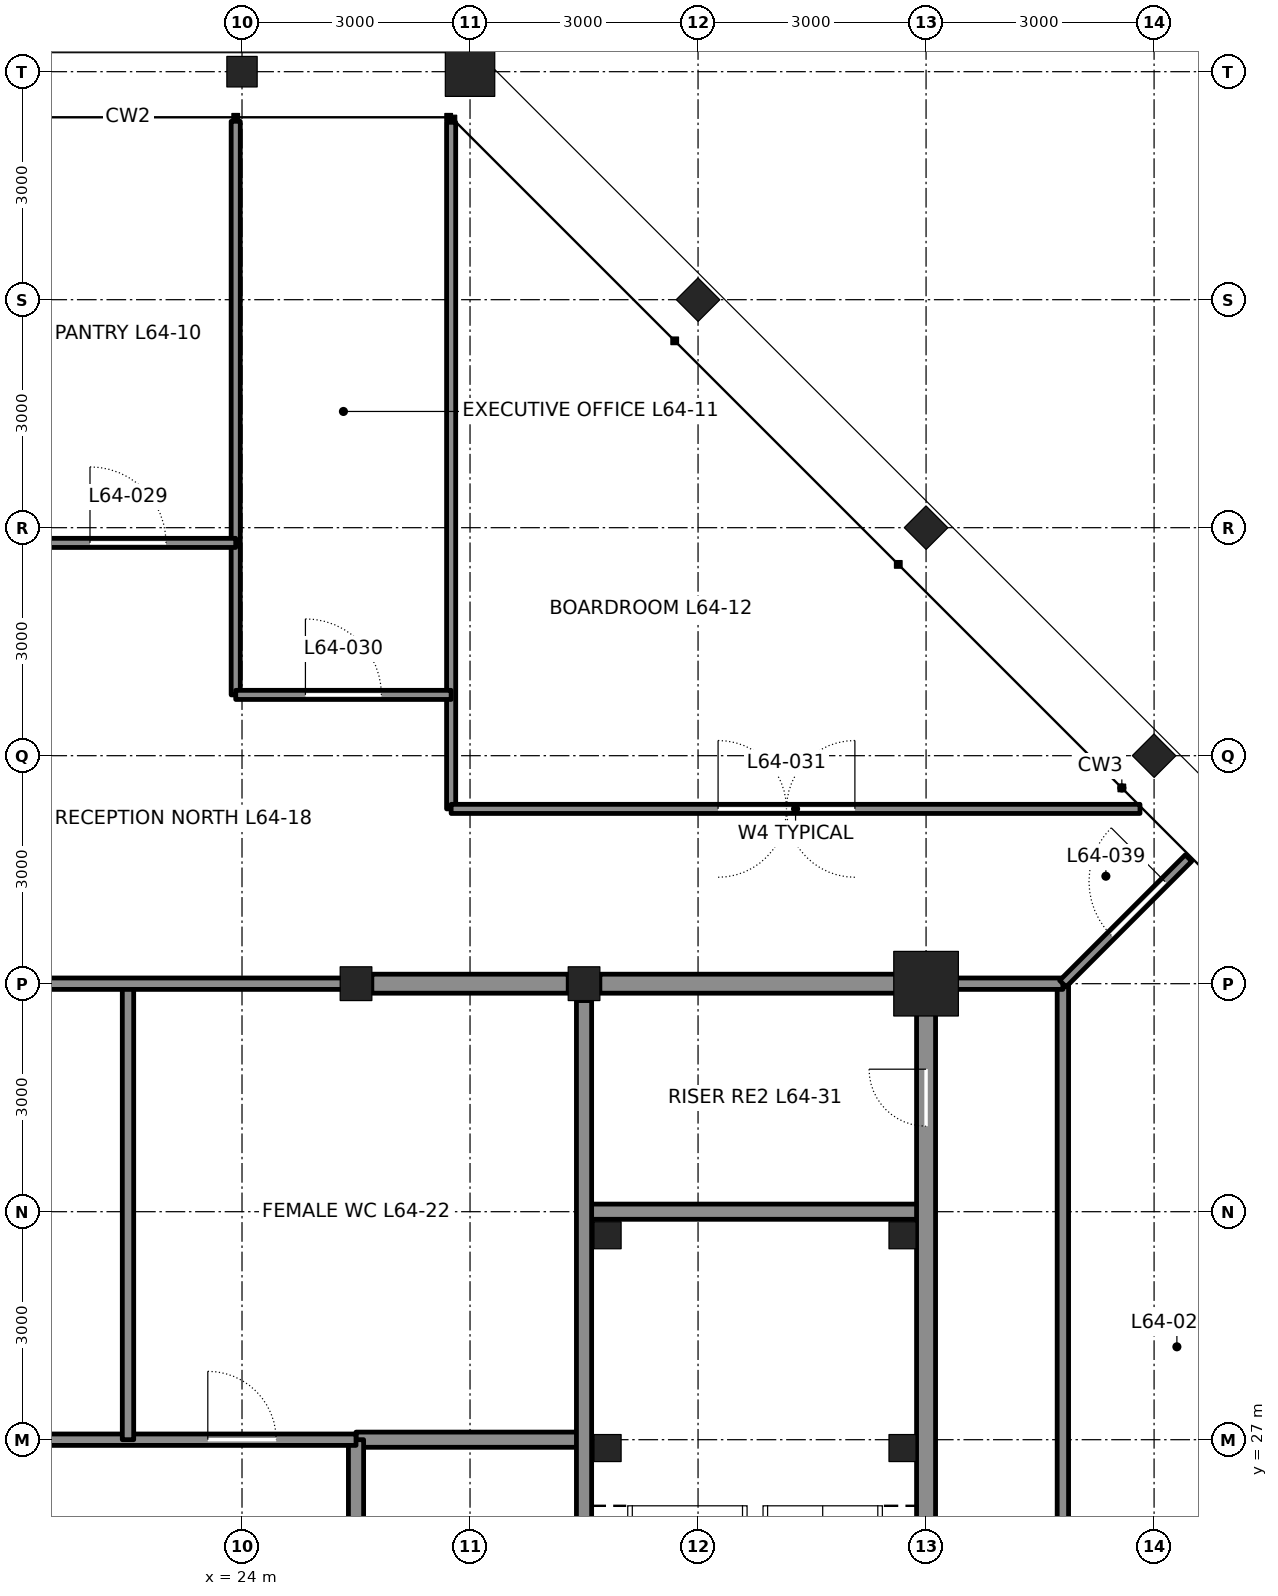
"""IFC4 building model, lengths in metres.
Left out: names, types, materials, properties, quantities, classifications, styles, units other than length and angle.
Written with IfcOpenShell. Run it as: python <this file> out.ifc"""

import sys

from ifc_helpers import new_model, si_unit, direction, frame, frame_2d, origin, origin_2d, place, context, subcontext, project, spatial, rectangle, hollow_rectangle, i_section, extrude, element, fill, save


model = new_model("IFC4")
c1 = context("Model", 3, precision=1e-05, world=origin(), true_north=direction((0.0, 1.0)))
c2 = subcontext(c1, "Body", "Model", "MODEL_VIEW")
j1 = project(units=[si_unit("LENGTHUNIT", "METRE"), si_unit("PLANEANGLEUNIT", "RADIAN")], contexts=[c1])
p1 = place(None, origin())
s1 = spatial("IfcSite", under=j1, at=p1, CompositionType="ELEMENT")
p2 = place(p1, origin())
s2 = spatial("IfcBuilding", under=s1, at=p2, CompositionType="ELEMENT")
p3 = place(p2, frame((0.0, 0.0, 287.4)))
s3 = spatial("IfcBuildingStorey", under=s2, at=p3, CompositionType="ELEMENT", Elevation=287.4)
for number, where, z_axis, x_axis in (
    (1, (36.0, 36.0, 0.0), (0.0, 0.0, 1.0), (0.707, 0.707, 0.0)),
    (2, (33.0, 39.0, 0.0), (0.0, 0.0, 1.0), (0.707, 0.707, 0.0)),
    (3, (30.0, 42.0, 0.0), (0.0, 0.0, 1.0), (0.707, 0.707, 0.0)),
):
    element("IfcColumn", number, at=place(p3, frame(where, z_axis=z_axis, x_axis=x_axis)), inside=s3, PredefinedType="COLUMN", context=c2, shape_type="SweptSolid", body=[
        extrude(i_section(OverallWidth=0.404, OverallDepth=0.406, WebThickness=0.027, FlangeThickness=0.044, at=origin_2d()), origin(), (0.0, 0.0, 1.0), 4.2),
    ])
p4 = place(p3, frame((27.0, 45.0, 0.0), z_axis=(0.0, 0.0, 1.0), x_axis=(0.0, 1.0, 0.0)))
e4 = element("IfcColumn", 4, at=p4, inside=s3, PredefinedType="COLUMN", context=c2, shape_type="SweptSolid", body=[
    extrude(hollow_rectangle(XDim=0.65, YDim=0.65, WallThickness=0.065, at=origin_2d()), origin(), (0.0, 0.0, 1.0), 4.2),
])
p5 = place(p3, frame((24.0, 45.0, 0.0), z_axis=(0.0, 0.0, 1.0), x_axis=(0.0, 1.0, 0.0)))
e5 = element("IfcColumn", 5, at=p5, inside=s3, PredefinedType="COLUMN", context=c2, shape_type="SweptSolid", body=[
    extrude(i_section(OverallWidth=0.401, OverallDepth=0.399, WebThickness=0.025, FlangeThickness=0.04, at=origin_2d()), origin(), (0.0, 0.0, 1.0), 4.2),
])
for number, where, z_axis, x_axis in (
    (6, (25.5, 33.0, 0.0), (0.0, 0.0, 1.0), (1.0, 0.0, 0.0)),
    (7, (28.5, 33.0, 0.0), (0.0, 0.0, 1.0), (1.0, 0.0, 0.0)),
):
    element("IfcColumn", number, at=place(p3, frame(where, z_axis=z_axis, x_axis=x_axis)), inside=s3, PredefinedType="COLUMN", context=c2, shape_type="SweptSolid", body=[
        extrude(i_section(OverallWidth=0.417, OverallDepth=0.445, WebThickness=0.039, FlangeThickness=0.063, at=origin_2d()), origin(), (0.0, 0.0, 1.0), 4.2),
    ])
p6 = place(p3, frame((33.0, 33.0, 0.0), z_axis=(0.0, 0.0, 1.0), x_axis=(1.0, 0.0, 0.0)))
e8 = element("IfcColumn", 8, at=p6, inside=s3, PredefinedType="COLUMN", context=c2, shape_type="SweptSolid", body=[
    extrude(hollow_rectangle(XDim=0.85, YDim=0.85, WallThickness=0.085, at=origin_2d()), origin(), (0.0, 0.0, 1.0), 4.2),
])
p7 = place(p3, frame((25.5, 27.0, 0.0), z_axis=(0.0, 0.0, 1.0), x_axis=(1.0, 0.0, 0.0)))
e9 = element("IfcWall", 9, at=p7, inside=s3, PredefinedType="SOLIDWALL", context=c2, shape_type="SweptSolid", body=[
    extrude(rectangle(XDim=3.0, YDim=0.2, at=frame_2d((1.5, 0.0))), origin(), (0.0, 0.0, 1.0), 4.04),
])
p8 = place(p3, frame((28.5, 30.0, 0.0), z_axis=(0.0, 0.0, 1.0), x_axis=(1.0, 0.0, 0.0)))
e10 = element("IfcWall", 10, at=p8, inside=s3, PredefinedType="SOLIDWALL", context=c2, shape_type="SweptSolid", body=[
    extrude(rectangle(XDim=4.5, YDim=0.2, at=frame_2d((2.25, 0.0))), origin(), (0.0, 0.0, 1.0), 4.04),
])
p9 = place(p3, frame((25.708, 33.0, 0.0), z_axis=(0.0, 0.0, 1.0), x_axis=(1.0, 0.0, 0.0)))
e11 = element("IfcWall", 11, at=p9, inside=s3, PredefinedType="SOLIDWALL", context=c2, shape_type="SweptSolid", body=[
    extrude(rectangle(XDim=2.583, YDim=0.25, at=frame_2d((1.292, 0.0))), origin(), (0.0, 0.0, 1.0), 3.182),
])
p10 = place(p3, frame((28.708, 33.0, 0.0), z_axis=(0.0, 0.0, 1.0), x_axis=(1.0, 0.0, 0.0)))
e12 = element("IfcWall", 12, at=p10, inside=s3, PredefinedType="SOLIDWALL", context=c2, shape_type="SweptSolid", body=[
    extrude(rectangle(XDim=4.042, YDim=0.25, at=frame_2d((2.021, 0.0))), origin(), (0.0, 0.0, 1.0), 3.182),
])
p11 = place(p3, frame((25.5, 15.0, 0.0), z_axis=(0.0, 0.0, 1.0), x_axis=(0.0, 1.0, 0.0)))
e13 = element("IfcWall", 13, at=p11, inside=s3, PredefinedType="SOLIDWALL", context=c2, shape_type="SweptSolid", body=[
    extrude(rectangle(XDim=12.0, YDim=0.2, at=frame_2d((6.0, 0.0))), origin(), (0.0, 0.0, 1.0), 3.065),
])
p12 = place(p11, frame((2.55, 0.0, 0.0)))
e14 = element("IfcOpeningElement", 14, at=p12, cuts=e13, PredefinedType="OPENING", context=c2, shape_type="SweptSolid", body=[
    extrude(rectangle(XDim=0.9, YDim=2.1, at=frame_2d((0.45, 1.05))), frame((0.0, 0.11, 0.0), z_axis=(0.0, -1.0, 0.0), x_axis=(1.0, 0.0, 0.0)), (0.0, 0.0, 1.0), 0.22),
])
p13 = place(p3, frame((28.5, 24.222, 0.0), z_axis=(0.0, 0.0, 1.0), x_axis=(0.0, 1.0, 0.0)))
e15 = element("IfcWall", 15, at=p13, inside=s3, PredefinedType="SOLIDWALL", context=c2, shape_type="SweptSolid", body=[
    extrude(rectangle(XDim=8.555, YDim=0.2, at=frame_2d((4.278, 0.0))), origin(), (0.0, 0.0, 1.0), 3.113),
])
p14 = place(p3, frame((33.0, 24.222, 0.0), z_axis=(0.0, 0.0, 1.0), x_axis=(0.0, 1.0, 0.0)))
e16 = element("IfcWall", 16, at=p14, inside=s3, PredefinedType="SOLIDWALL", context=c2, shape_type="SweptSolid", body=[
    extrude(rectangle(XDim=8.528, YDim=0.25, at=frame_2d((4.264, 0.0))), origin(), (0.0, 0.0, 1.0), 3.113),
])
p15 = place(p14, frame((6.903, 0.0, 0.0)))
e17 = element("IfcOpeningElement", 17, at=p15, cuts=e16, PredefinedType="OPENING", context=c2, shape_type="SweptSolid", body=[
    extrude(rectangle(XDim=0.75, YDim=2.1, at=frame_2d((0.375, 1.05))), frame((0.0, 0.135, 0.0), z_axis=(0.0, -1.0, 0.0), x_axis=(1.0, 0.0, 0.0)), (0.0, 0.0, 1.0), 0.27),
])
p16 = place(p3, frame((19.5, 27.0, 0.0), z_axis=(0.0, 0.0, 1.0), x_axis=(1.0, 0.0, 0.0)))
e18 = element("IfcWall", 18, at=p16, inside=s3, PredefinedType="PARTITIONING", context=c2, shape_type="SweptSolid", body=[
    extrude(rectangle(XDim=6.0, YDim=0.15, at=frame_2d((3.0, 0.0))), origin(), (0.0, 0.0, 1.0), 4.04),
])
p17 = place(p16, frame((1.05, 0.0, 0.0)))
e19 = element("IfcOpeningElement", 19, at=p17, cuts=e18, PredefinedType="OPENING", context=c2, shape_type="SweptSolid", body=[
    extrude(rectangle(XDim=0.9, YDim=2.1, at=frame_2d((0.45, 1.05))), frame((0.0, 0.085, 0.0), z_axis=(0.0, -1.0, 0.0), x_axis=(1.0, 0.0, 0.0)), (0.0, 0.0, 1.0), 0.17),
])
p18 = place(p16, frame((4.05, 0.0, 0.0)))
e20 = element("IfcOpeningElement", 20, at=p18, cuts=e18, PredefinedType="OPENING", context=c2, shape_type="SweptSolid", body=[
    extrude(rectangle(XDim=0.9, YDim=2.1, at=frame_2d((0.45, 1.05))), frame((0.0, 0.085, 0.0), z_axis=(0.0, -1.0, 0.0), x_axis=(1.0, 0.0, 0.0)), (0.0, 0.0, 1.0), 0.17),
])
p19 = place(p3, frame((22.5, 27.0, 0.0), z_axis=(0.0, 0.0, 1.0), x_axis=(0.0, 1.0, 0.0)))
e21 = element("IfcWall", 21, at=p19, inside=s3, PredefinedType="PARTITIONING", context=c2, shape_type="SweptSolid", body=[
    extrude(rectangle(XDim=6.0, YDim=0.15, at=frame_2d((3.0, 0.0))), origin(), (0.0, 0.0, 1.0), 4.04),
])
p20 = place(p3, frame((19.5, 33.0, 0.0), z_axis=(0.0, 0.0, 1.0), x_axis=(1.0, 0.0, 0.0)))
e22 = element("IfcWall", 22, at=p20, inside=s3, PredefinedType="PARTITIONING", context=c2, shape_type="SweptSolid", body=[
    extrude(rectangle(XDim=6.0, YDim=0.15, at=frame_2d((3.0, 0.0))), origin(), (0.0, 0.0, 1.0), 3.182),
])
p21 = place(p3, frame((23.917, 44.347, 0.0), z_axis=(0.0, 0.0, 1.0), x_axis=(0.0, -1.0, 0.0)))
e23 = element("IfcWall", 23, at=p21, inside=s3, PredefinedType="PARTITIONING", context=c2, shape_type="SweptSolid", body=[
    extrude(rectangle(XDim=7.547, YDim=0.12, at=frame_2d((3.774, 0.0))), origin(), (0.0, 0.0, 1.0), 3.357),
])
p22 = place(p3, frame((26.751, 44.334, 0.0), z_axis=(0.0, 0.0, 1.0), x_axis=(0.0, -1.0, 0.0)))
e24 = element("IfcWall", 24, at=p22, inside=s3, PredefinedType="PARTITIONING", context=c2, shape_type="SweptSolid", body=[
    extrude(rectangle(XDim=9.034, YDim=0.12, at=frame_2d((4.517, 0.0))), origin(), (0.0, 0.0, 1.0), 4.04),
])
p23 = place(p3, frame((21.083, 38.8, 0.0), z_axis=(0.0, 0.0, 1.0), x_axis=(1.0, 0.0, 0.0)))
e25 = element("IfcWall", 25, at=p23, inside=s3, PredefinedType="PARTITIONING", context=c2, shape_type="SweptSolid", body=[
    extrude(rectangle(XDim=2.834, YDim=0.12, at=frame_2d((1.417, 0.0))), origin(), (0.0, 0.0, 1.0), 4.04),
])
p24 = place(p23, frame((0.917, 0.0, 0.0)))
e26 = element("IfcOpeningElement", 26, at=p24, cuts=e25, PredefinedType="OPENING", context=c2, shape_type="SweptSolid", body=[
    extrude(rectangle(XDim=1.0, YDim=2.4, at=frame_2d((0.5, 1.2))), frame((0.0, 0.07, 0.0), z_axis=(0.0, -1.0, 0.0), x_axis=(1.0, 0.0, 0.0)), (0.0, 0.0, 1.0), 0.14),
])
p25 = place(p3, frame((23.917, 36.8, 0.0), z_axis=(0.0, 0.0, 1.0), x_axis=(1.0, 0.0, 0.0)))
e27 = element("IfcWall", 27, at=p25, inside=s3, PredefinedType="PARTITIONING", context=c2, shape_type="SweptSolid", body=[
    extrude(rectangle(XDim=2.834, YDim=0.12, at=frame_2d((1.417, 0.0))), origin(), (0.0, 0.0, 1.0), 4.04),
])
p26 = place(p25, frame((0.917, 0.0, 0.0)))
e28 = element("IfcOpeningElement", 28, at=p26, cuts=e27, PredefinedType="OPENING", context=c2, shape_type="SweptSolid", body=[
    extrude(rectangle(XDim=1.0, YDim=2.4, at=frame_2d((0.5, 1.2))), frame((0.0, 0.07, 0.0), z_axis=(0.0, -1.0, 0.0), x_axis=(1.0, 0.0, 0.0)), (0.0, 0.0, 1.0), 0.14),
])
p27 = place(p3, frame((26.751, 35.3, 0.0), z_axis=(0.0, 0.0, 1.0), x_axis=(1.0, 0.0, 0.0)))
e29 = element("IfcWall", 29, at=p27, inside=s3, PredefinedType="PARTITIONING", context=c2, shape_type="SweptSolid", body=[
    extrude(rectangle(XDim=9.063, YDim=0.12, at=frame_2d((4.531, 0.0))), origin(), (0.0, 0.0, 1.0), 4.04),
])
p28 = place(p27, frame((3.512, 0.0, 0.0)))
e30 = element("IfcOpeningElement", 30, at=p28, cuts=e29, PredefinedType="OPENING", context=c2, shape_type="SweptSolid", body=[
    extrude(rectangle(XDim=1.8, YDim=2.4, at=frame_2d((0.9, 1.2))), frame((0.0, 0.07, 0.0), z_axis=(0.0, -1.0, 0.0), x_axis=(1.0, 0.0, 0.0)), (0.0, 0.0, 1.0), 0.14),
])
p29 = place(p3, frame((34.8, 8.686, 0.0), z_axis=(0.0, 0.0, 1.0), x_axis=(0.0, 1.0, 0.0)))
e31 = element("IfcWall", 31, at=p29, inside=s3, PredefinedType="PARTITIONING", context=c2, shape_type="SweptSolid", body=[
    extrude(rectangle(XDim=24.314, YDim=0.15, at=frame_2d((12.157, 0.0))), origin(), (0.0, 0.0, 1.0), 4.04),
])
p30 = place(p29, frame((11.5, 0.0, 0.0)))
e32 = element("IfcOpeningElement", 32, at=p30, cuts=e31, PredefinedType="OPENING", context=c2, shape_type="SweptSolid", body=[
    extrude(rectangle(XDim=1.0, YDim=2.4, at=frame_2d((0.5, 1.2))), frame((0.0, 0.085, 0.0), z_axis=(0.0, -1.0, 0.0), x_axis=(1.0, 0.0, 0.0)), (0.0, 0.0, 1.0), 0.17),
])
p31 = place(p3, frame((33.0, 33.0, 0.0), z_axis=(0.0, 0.0, 1.0), x_axis=(1.0, 0.0, 0.0)))
e33 = element("IfcWall", 33, at=p31, inside=s3, PredefinedType="PARTITIONING", context=c2, shape_type="SweptSolid", body=[
    extrude(rectangle(XDim=1.8, YDim=0.15, at=frame_2d((0.9, 0.0))), origin(), (0.0, 0.0, 1.0), 3.271),
])
p32 = place(p3, frame((34.8, 33.0, 0.0), z_axis=(0.0, 0.0, 1.0), x_axis=(0.707106781187, 0.707106781187, 0.0)))
e34 = element("IfcWall", 34, at=p32, inside=s3, PredefinedType="PARTITIONING", context=c2, shape_type="SweptSolid", body=[
    extrude(rectangle(XDim=2.338, YDim=0.12, at=frame_2d((1.169, 0.0))), origin(), (0.0, 0.0, 1.0), 4.04),
])
p33 = place(p32, frame((0.9, 0.0, 0.0)))
e35 = element("IfcOpeningElement", 35, at=p33, cuts=e34, PredefinedType="OPENING", context=c2, shape_type="SweptSolid", body=[
    extrude(rectangle(XDim=1.0, YDim=2.4, at=frame_2d((0.5, 1.2))), frame((0.0, 0.07, 0.0), z_axis=(0.0, -1.0, 0.0), x_axis=(1.0, 0.0, 0.0)), (0.0, 0.0, 1.0), 0.14),
])
for number, where, z_axis, x_axis in (
    (36, (28.81, 29.69, 0.0), (0.0, 0.0, 1.0), (1.0, 0.0, 0.0)),
    (37, (32.69, 29.69, 0.0), (0.0, 0.0, 1.0), (1.0, 0.0, 0.0)),
    (38, (28.81, 26.89, 0.0), (0.0, 0.0, 1.0), (1.0, 0.0, 0.0)),
    (39, (32.69, 26.89, 0.0), (0.0, 0.0, 1.0), (1.0, 0.0, 0.0)),
):
    element("IfcColumn", number, at=place(p3, frame(where, z_axis=z_axis, x_axis=x_axis)), inside=s3, PredefinedType="COLUMN", context=c2, shape_type="SweptSolid", body=[
        extrude(hollow_rectangle(XDim=0.356, YDim=0.356, WallThickness=0.009, at=origin_2d()), origin(), (0.0, 0.0, 1.0), 4.2),
    ])
p34 = place(p15, origin())
e40 = element("IfcDoor", 40, at=p34, inside=s3, OperationType="SINGLE_SWING_RIGHT", PredefinedType="DOOR", context=c2, shape_type="SweptSolid", body=[
    extrude(rectangle(XDim=0.75, YDim=2.1, at=frame_2d((0.375, 1.05))), frame((0.0, 0.025, 0.0), z_axis=(0.0, -1.0, 0.0), x_axis=(1.0, 0.0, 0.0)), (0.0, 0.0, 1.0), 0.05),
])
fill(e17, e40)
p35 = place(p18, origin())
e41 = element("IfcDoor", 41, at=p35, inside=s3, OperationType="SINGLE_SWING_LEFT", PredefinedType="DOOR", context=c2, shape_type="SweptSolid", body=[
    extrude(rectangle(XDim=0.9, YDim=2.1, at=frame_2d((0.45, 1.05))), frame((0.0, 0.025, 0.0), z_axis=(0.0, -1.0, 0.0), x_axis=(1.0, 0.0, 0.0)), (0.0, 0.0, 1.0), 0.05),
])
fill(e20, e41)
p36 = place(p24, origin())
e42 = element("IfcDoor", 42, at=p36, inside=s3, OperationType="SINGLE_SWING_LEFT", PredefinedType="DOOR", context=c2, shape_type="SweptSolid", body=[
    extrude(rectangle(XDim=1.0, YDim=2.4, at=frame_2d((0.5, 1.2))), frame((0.0, 0.025, 0.0), z_axis=(0.0, -1.0, 0.0), x_axis=(1.0, 0.0, 0.0)), (0.0, 0.0, 1.0), 0.05),
])
fill(e26, e42)
p37 = place(p26, origin())
e43 = element("IfcDoor", 43, at=p37, inside=s3, OperationType="SINGLE_SWING_LEFT", PredefinedType="DOOR", context=c2, shape_type="SweptSolid", body=[
    extrude(rectangle(XDim=1.0, YDim=2.4, at=frame_2d((0.5, 1.2))), frame((0.0, 0.025, 0.0), z_axis=(0.0, -1.0, 0.0), x_axis=(1.0, 0.0, 0.0)), (0.0, 0.0, 1.0), 0.05),
])
fill(e28, e43)
p38 = place(p28, origin())
e44 = element("IfcDoor", 44, at=p38, inside=s3, OperationType="DOUBLE_DOOR_DOUBLE_SWING", PredefinedType="DOOR", context=c2, shape_type="SweptSolid", body=[
    extrude(rectangle(XDim=1.8, YDim=2.4, at=frame_2d((0.9, 1.2))), frame((0.0, 0.025, 0.0), z_axis=(0.0, -1.0, 0.0), x_axis=(1.0, 0.0, 0.0)), (0.0, 0.0, 1.0), 0.05),
])
fill(e30, e44)
p39 = place(p33, origin())
e45 = element("IfcDoor", 45, at=p39, inside=s3, OperationType="SINGLE_SWING_RIGHT", PredefinedType="DOOR", context=c2, shape_type="SweptSolid", body=[
    extrude(rectangle(XDim=1.0, YDim=2.4, at=frame_2d((0.5, 1.2))), frame((0.0, 0.025, 0.0), z_axis=(0.0, -1.0, 0.0), x_axis=(1.0, 0.0, 0.0)), (0.0, 0.0, 1.0), 0.05),
])
fill(e35, e45)
save(model, sys.argv[1])
